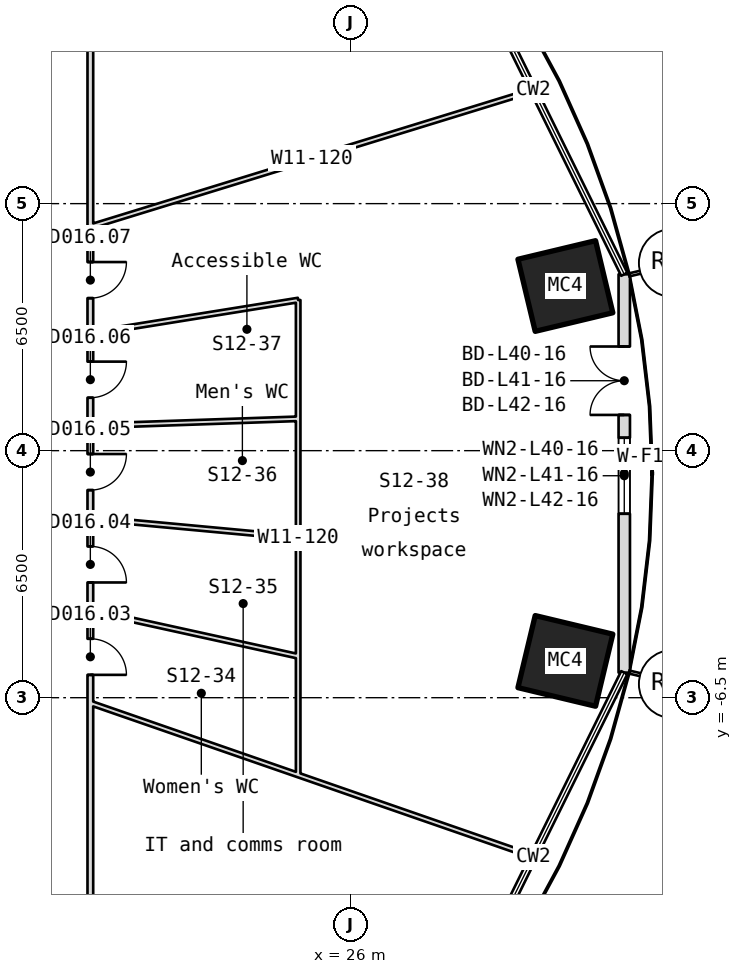
"""IFC4 building model, lengths in metres.
Left out: names, types, materials, properties, quantities, classifications, styles, units other than length and angle.
Written with IfcOpenShell. Run it as: python <this file> out.ifc"""

import sys

from ifc_helpers import new_model, si_unit, direction, frame, frame_2d, origin, origin_2d, place, context, subcontext, project, spatial, rectangle, hollow_rectangle, extrude, element, fill, save


model = new_model("IFC4")
c1 = context("Model", 3, precision=1e-05, world=origin(), true_north=direction((0.0, 1.0)))
c2 = subcontext(c1, "Body", "Model", "MODEL_VIEW")
j1 = project(units=[si_unit("LENGTHUNIT", "METRE"), si_unit("PLANEANGLEUNIT", "RADIAN")], contexts=[c1])
p1 = place(None, origin())
s1 = spatial("IfcSite", under=j1, at=p1, CompositionType="ELEMENT")
p2 = place(p1, origin())
s2 = spatial("IfcBuilding", under=s1, at=p2, CompositionType="ELEMENT")
p3 = place(p2, frame((0.0, 0.0, 185.95)))
s3 = spatial("IfcBuildingStorey", under=s2, at=p3, CompositionType="ELEMENT", Elevation=185.95)
for number, where, z_axis, x_axis in (
    (1, (31.65, 4.332, -0.18), (0.0, 0.0, 1.0), (0.233, -0.973, 0.0)),
    (2, (31.65, -5.532, -0.18), (0.0, 0.0, 1.0), (-0.233, -0.973, 0.0)),
):
    element("IfcColumn", number, at=place(p3, frame(where, z_axis=z_axis, x_axis=x_axis)), inside=s3, PredefinedType="COLUMN", context=c2, shape_type="SweptSolid", body=[
        extrude(hollow_rectangle(XDim=1.95, YDim=2.1, WallThickness=0.075, at=origin_2d()), origin(), (0.0, 0.0, 1.0), 4.15),
    ])
p4 = place(p3, frame((33.2, -5.84, 0.0), z_axis=(0.0, 0.0, 1.0), x_axis=(0.0, 1.0, 0.0)))
e3 = element("IfcWall", 3, at=p4, inside=s3, PredefinedType="SOLIDWALL", context=c2, shape_type="SweptSolid", body=[
    extrude(rectangle(XDim=10.481, YDim=0.3, at=frame_2d((5.24, 0.0))), origin(), (0.0, 0.0, 1.0), 3.97),
])
p5 = place(p4, frame((6.781, 0.0, 0.0)))
e4 = element("IfcOpeningElement", 4, at=p5, cuts=e3, PredefinedType="OPENING", context=c2, shape_type="SweptSolid", body=[
    extrude(rectangle(XDim=1.8, YDim=2.4, at=frame_2d((0.9, 1.2))), frame((0.0, 0.16, 0.0), z_axis=(0.0, -1.0, 0.0), x_axis=(1.0, 0.0, 0.0)), (0.0, 0.0, 1.0), 0.32),
])
p6 = place(p4, frame((4.181, 0.0, 0.9)))
e5 = element("IfcOpeningElement", 5, at=p6, cuts=e3, PredefinedType="OPENING", context=c2, shape_type="SweptSolid", body=[
    extrude(rectangle(XDim=2.0, YDim=1.5, at=frame_2d((1.0, 0.75))), frame((0.0, 0.16, 0.0), z_axis=(0.0, -1.0, 0.0), x_axis=(1.0, 0.0, 0.0)), (0.0, 0.0, 1.0), 0.32),
])
p7 = place(p3, frame((19.15, -6.639, 0.0), z_axis=(0.0, 0.0, 1.0), x_axis=(0.944824605936, -0.327576653652, 0.0)))
e6 = element("IfcWall", 6, at=p7, inside=s3, PredefinedType="PARTITIONING", context=c2, shape_type="SweptSolid", body=[
    extrude(rectangle(XDim=12.341, YDim=0.12, at=frame_2d((6.17, 0.0))), origin(), (0.0, 0.0, 1.0), 3.97),
])
p8 = place(p3, frame((19.15, 5.894, 0.0), z_axis=(0.0, 0.0, 1.0), x_axis=(0.955768190607, 0.29412100541, 0.0)))
e7 = element("IfcWall", 7, at=p8, inside=s3, PredefinedType="PARTITIONING", context=c2, shape_type="SweptSolid", body=[
    extrude(rectangle(XDim=12.199, YDim=0.12, at=frame_2d((6.1, 0.0))), origin(), (0.0, 0.0, 1.0), 3.97),
])
p9 = place(p3, frame((19.15, 14.854, 0.0), z_axis=(0.0, 0.0, 1.0), x_axis=(0.0, -1.0, 0.0)))
e8 = element("IfcWall", 8, at=p9, inside=s3, PredefinedType="PARTITIONING", context=c2, shape_type="SweptSolid", body=[
    extrude(rectangle(XDim=31.004, YDim=0.15, at=frame_2d((15.502, 0.0))), origin(), (0.0, 0.0, 1.0), 3.97),
])
p10 = place(p9, frame((19.803, 0.0, 0.0)))
e9 = element("IfcOpeningElement", 9, at=p10, cuts=e8, PredefinedType="OPENING", context=c2, shape_type="SweptSolid", body=[
    extrude(rectangle(XDim=0.95, YDim=2.1, at=frame_2d((0.475, 1.05))), frame((0.0, 0.085, 0.0), z_axis=(0.0, -1.0, 0.0), x_axis=(1.0, 0.0, 0.0)), (0.0, 0.0, 1.0), 0.17),
])
p11 = place(p9, frame((17.372, 0.0, 0.0)))
e10 = element("IfcOpeningElement", 10, at=p11, cuts=e8, PredefinedType="OPENING", context=c2, shape_type="SweptSolid", body=[
    extrude(rectangle(XDim=0.95, YDim=2.1, at=frame_2d((0.475, 1.05))), frame((0.0, 0.085, 0.0), z_axis=(0.0, -1.0, 0.0), x_axis=(1.0, 0.0, 0.0)), (0.0, 0.0, 1.0), 0.17),
])
p12 = place(p9, frame((14.942, 0.0, 0.0)))
e11 = element("IfcOpeningElement", 11, at=p12, cuts=e8, PredefinedType="OPENING", context=c2, shape_type="SweptSolid", body=[
    extrude(rectangle(XDim=0.95, YDim=2.1, at=frame_2d((0.475, 1.05))), frame((0.0, 0.085, 0.0), z_axis=(0.0, -1.0, 0.0), x_axis=(1.0, 0.0, 0.0)), (0.0, 0.0, 1.0), 0.17),
])
p13 = place(p9, frame((12.511, 0.0, 0.0)))
e12 = element("IfcOpeningElement", 12, at=p13, cuts=e8, PredefinedType="OPENING", context=c2, shape_type="SweptSolid", body=[
    extrude(rectangle(XDim=0.95, YDim=2.1, at=frame_2d((0.475, 1.05))), frame((0.0, 0.085, 0.0), z_axis=(0.0, -1.0, 0.0), x_axis=(1.0, 0.0, 0.0)), (0.0, 0.0, 1.0), 0.17),
])
p14 = place(p9, frame((9.891, 0.0, 0.0)))
e13 = element("IfcOpeningElement", 13, at=p14, cuts=e8, PredefinedType="OPENING", context=c2, shape_type="SweptSolid", body=[
    extrude(rectangle(XDim=0.95, YDim=2.1, at=frame_2d((0.475, 1.05))), frame((0.0, 0.085, 0.0), z_axis=(0.0, -1.0, 0.0), x_axis=(1.0, 0.0, 0.0)), (0.0, 0.0, 1.0), 0.17),
])
p15 = place(p3, frame((24.619, -8.535, 0.0), z_axis=(0.0, 0.0, 1.0), x_axis=(0.0, 1.0, 0.0)))
e14 = element("IfcWall", 14, at=p15, inside=s3, PredefinedType="PARTITIONING", context=c2, shape_type="SweptSolid", body=[
    extrude(rectangle(XDim=12.499, YDim=0.12, at=frame_2d((6.25, 0.0))), origin(), (0.0, 0.0, 1.0), 3.97),
])
p16 = place(p3, frame((24.619, -5.411, 0.0), z_axis=(0.0, 0.0, 1.0), x_axis=(-0.976690192817, 0.214653831216, 0.0)))
e15 = element("IfcWall", 15, at=p16, inside=s3, PredefinedType="PARTITIONING", context=c2, shape_type="SweptSolid", body=[
    extrude(rectangle(XDim=5.599, YDim=0.12, at=frame_2d((2.8, 0.0))), origin(), (0.0, 0.0, 1.0), 3.97),
])
p17 = place(p3, frame((24.619, -2.286, 0.0), z_axis=(0.0, 0.0, 1.0), x_axis=(-0.995720548073, 0.092415313368, 0.0)))
e16 = element("IfcWall", 16, at=p17, inside=s3, PredefinedType="PARTITIONING", context=c2, shape_type="SweptSolid", body=[
    extrude(rectangle(XDim=5.492, YDim=0.12, at=frame_2d((2.746, 0.0))), origin(), (0.0, 0.0, 1.0), 3.97),
])
p18 = place(p3, frame((24.619, 0.839, 0.0), z_axis=(0.0, 0.0, 1.0), x_axis=(-0.99942037738, -0.034042756605, 0.0)))
e17 = element("IfcWall", 17, at=p18, inside=s3, PredefinedType="PARTITIONING", context=c2, shape_type="SweptSolid", body=[
    extrude(rectangle(XDim=5.472, YDim=0.12, at=frame_2d((2.736, 0.0))), origin(), (0.0, 0.0, 1.0), 3.97),
])
p19 = place(p3, frame((24.619, 3.963, 0.0), z_axis=(0.0, 0.0, 1.0), x_axis=(-0.987288906474, -0.158935883783, 0.0)))
e18 = element("IfcWall", 18, at=p19, inside=s3, PredefinedType="PARTITIONING", context=c2, shape_type="SweptSolid", body=[
    extrude(rectangle(XDim=5.539, YDim=0.12, at=frame_2d((2.77, 0.0))), origin(), (0.0, 0.0, 1.0), 3.97),
])
p20 = place(p5, origin())
e19 = element("IfcDoor", 19, at=p20, inside=s3, OperationType="SINGLE_SWING_LEFT", PredefinedType="DOOR", context=c2, shape_type="SweptSolid", body=[
    extrude(rectangle(XDim=1.8, YDim=2.4, at=frame_2d((0.9, 1.2))), frame((0.0, 0.025, 0.0), z_axis=(0.0, -1.0, 0.0), x_axis=(1.0, 0.0, 0.0)), (0.0, 0.0, 1.0), 0.05),
])
fill(e4, e19)
p21 = place(p6, origin())
e20 = element("IfcWindow", 20, at=p21, inside=s3, PartitioningType="SINGLE_PANEL", PredefinedType="WINDOW", context=c2, shape_type="SweptSolid", body=[
    extrude(rectangle(XDim=2.0, YDim=1.5, at=frame_2d((1.0, 0.75))), frame((0.0, 0.03, 0.0), z_axis=(0.0, -1.0, 0.0), x_axis=(1.0, 0.0, 0.0)), (0.0, 0.0, 1.0), 0.06),
])
fill(e5, e20)
p22 = place(p10, origin())
e21 = element("IfcDoor", 21, at=p22, inside=s3, OperationType="SINGLE_SWING_RIGHT", PredefinedType="DOOR", context=c2, shape_type="SweptSolid", body=[
    extrude(rectangle(XDim=0.95, YDim=2.1, at=frame_2d((0.475, 1.05))), frame((0.0, 0.025, 0.0), z_axis=(0.0, -1.0, 0.0), x_axis=(1.0, 0.0, 0.0)), (0.0, 0.0, 1.0), 0.05),
])
fill(e9, e21)
p23 = place(p11, origin())
e22 = element("IfcDoor", 22, at=p23, inside=s3, OperationType="SINGLE_SWING_RIGHT", PredefinedType="DOOR", context=c2, shape_type="SweptSolid", body=[
    extrude(rectangle(XDim=0.95, YDim=2.1, at=frame_2d((0.475, 1.05))), frame((0.0, 0.025, 0.0), z_axis=(0.0, -1.0, 0.0), x_axis=(1.0, 0.0, 0.0)), (0.0, 0.0, 1.0), 0.05),
])
fill(e10, e22)
p24 = place(p12, origin())
e23 = element("IfcDoor", 23, at=p24, inside=s3, OperationType="SINGLE_SWING_RIGHT", PredefinedType="DOOR", context=c2, shape_type="SweptSolid", body=[
    extrude(rectangle(XDim=0.95, YDim=2.1, at=frame_2d((0.475, 1.05))), frame((0.0, 0.025, 0.0), z_axis=(0.0, -1.0, 0.0), x_axis=(1.0, 0.0, 0.0)), (0.0, 0.0, 1.0), 0.05),
])
fill(e11, e23)
p25 = place(p13, origin())
e24 = element("IfcDoor", 24, at=p25, inside=s3, OperationType="SINGLE_SWING_RIGHT", PredefinedType="DOOR", context=c2, shape_type="SweptSolid", body=[
    extrude(rectangle(XDim=0.95, YDim=2.1, at=frame_2d((0.475, 1.05))), frame((0.0, 0.025, 0.0), z_axis=(0.0, -1.0, 0.0), x_axis=(1.0, 0.0, 0.0)), (0.0, 0.0, 1.0), 0.05),
])
fill(e12, e24)
p26 = place(p14, origin())
e25 = element("IfcDoor", 25, at=p26, inside=s3, OperationType="SINGLE_SWING_RIGHT", PredefinedType="DOOR", context=c2, shape_type="SweptSolid", body=[
    extrude(rectangle(XDim=0.95, YDim=2.1, at=frame_2d((0.475, 1.05))), frame((0.0, 0.025, 0.0), z_axis=(0.0, -1.0, 0.0), x_axis=(1.0, 0.0, 0.0)), (0.0, 0.0, 1.0), 0.05),
])
fill(e13, e25)
save(model, sys.argv[1])
